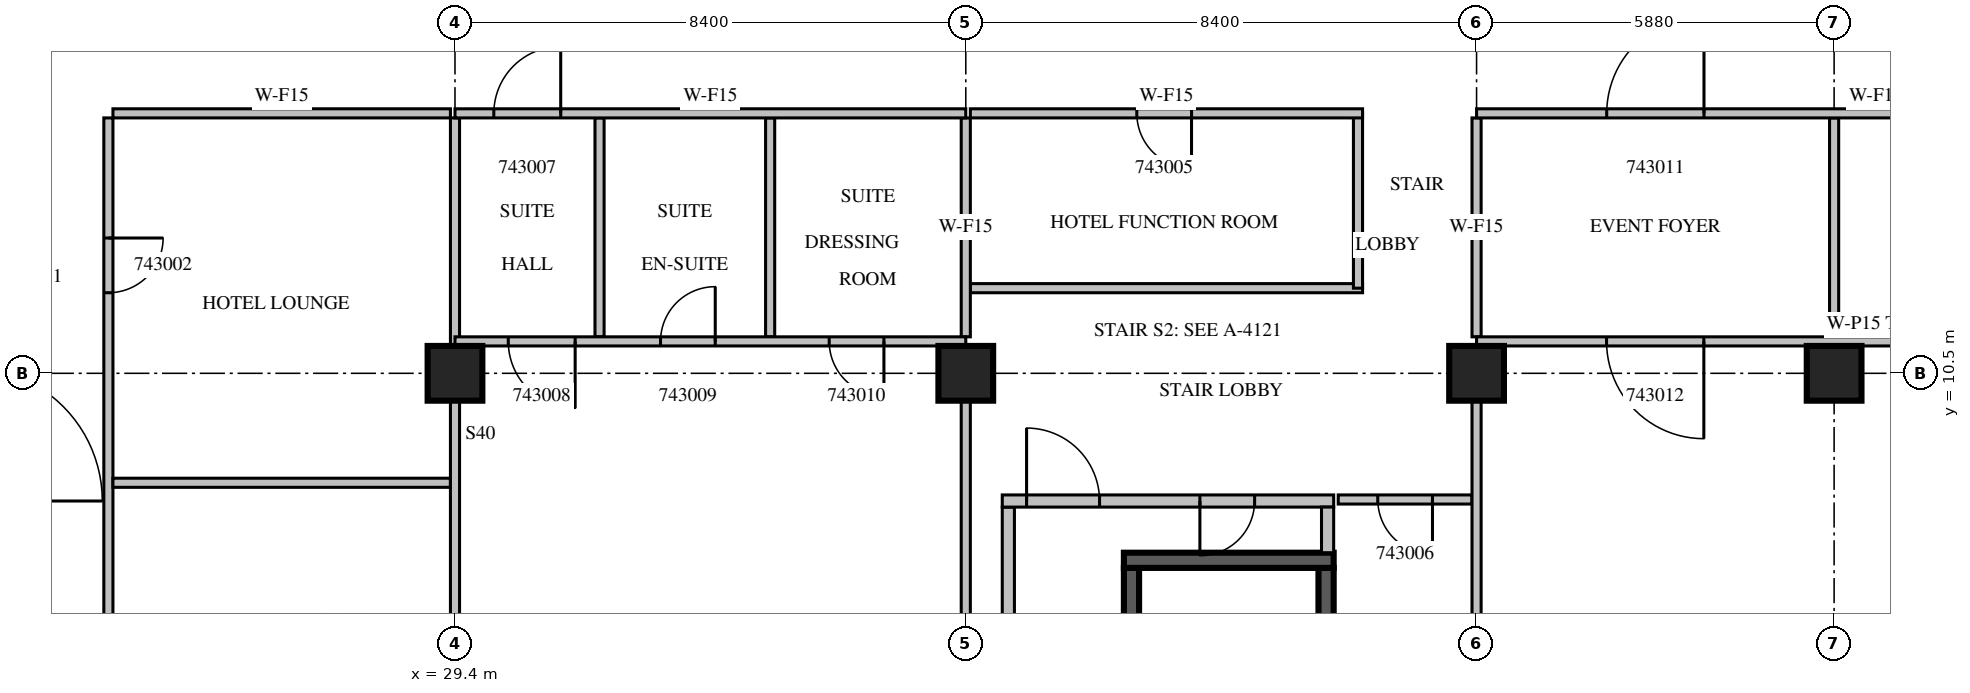
"""IFC4 building model, lengths in metres.
Left out: names, types, materials, properties, quantities, classifications, styles, units other than length and angle.
Written with IfcOpenShell. Run it as: python <this file> out.ifc"""

import sys

from ifc_helpers import new_model, si_unit, direction, frame, frame_2d, origin, origin_2d, place, context, subcontext, project, spatial, rectangle, extrude, source, transform, mapped, element, fill, save


model = new_model("IFC4")
c1 = context("Model", 3, precision=1e-05, world=origin(), true_north=direction((0.0, 1.0)))
c2 = subcontext(c1, "Body", "Model", "MODEL_VIEW")
j1 = project(units=[si_unit("LENGTHUNIT", "METRE"), si_unit("PLANEANGLEUNIT", "RADIAN")], contexts=[c1])
p1 = place(None, origin())
s1 = spatial("IfcSite", under=j1, at=p1, CompositionType="ELEMENT")
p2 = place(p1, origin())
s2 = spatial("IfcBuilding", under=s1, at=p2, CompositionType="ELEMENT")
p3 = place(p2, frame((0.0, 0.0, 196.8)))
s3 = spatial("IfcBuildingStorey", under=s2, at=p3, CompositionType="ELEMENT", Elevation=196.8)
m1 = source(origin(), c2, "Body", "SweptSolid", [
    extrude(rectangle(XDim=0.9, YDim=0.9, at=origin_2d()), origin(), (0.0, 0.0, 1.0), 3.8),
])
for number, where, z_axis, x_axis in (
    (1, (29.4, 10.5, 0.0), (0.0, 0.0, 1.0), (1.0, 0.0, 0.0)),
    (2, (37.8, 10.5, 0.0), (0.0, 0.0, 1.0), (1.0, 0.0, 0.0)),
    (3, (46.2, 10.5, 0.0), (0.0, 0.0, 1.0), (1.0, 0.0, 0.0)),
    (4, (52.08, 10.5, 0.0), (0.0, 0.0, 1.0), (1.0, 0.0, 0.0)),
):
    element("IfcColumn", number, at=place(p3, frame(where, z_axis=z_axis, x_axis=x_axis)), inside=s3, PredefinedType="COLUMN", context=c2, shape_type="MappedRepresentation", body=[
        mapped(m1, transform((0.0, 0.0, 0.0), scale=1.0)),
    ])
m2 = source(origin(), c2, "Body", "SweptSolid", [
    extrude(rectangle(XDim=7.0, YDim=0.25, at=frame_2d((3.5, 0.0))), origin(), (0.0, 0.0, 1.0), 3.4),
])
p4 = place(p3, frame((40.525, 0.3, 0.0), z_axis=(0.0, 0.0, 1.0), x_axis=(0.0, 1.0, 0.0)))
e5 = element("IfcWall", 5, at=p4, inside=s3, PredefinedType="SOLIDWALL", context=c2, shape_type="MappedRepresentation", body=[
    mapped(m2, transform((0.0, 0.0, 0.0), scale=1.0)),
])
m3 = source(origin(), c2, "Body", "SweptSolid", [
    extrude(rectangle(XDim=1.1, YDim=2.1, at=frame_2d((0.55, 1.05))), frame((0.0, 0.135, 0.0), z_axis=(0.0, -1.0, 0.0), x_axis=(1.0, 0.0, 0.0)), (0.0, 0.0, 1.0), 0.27),
])
p5 = place(p4, frame((0.55, 0.0, 0.0)))
e6 = element("IfcOpeningElement", 6, at=p5, cuts=e5, PredefinedType="OPENING", context=c2, shape_type="MappedRepresentation", body=[
    mapped(m3, transform((0.0, 0.0, 0.0), scale=1.0)),
])
p6 = place(p3, frame((43.725, 0.3, 0.0), z_axis=(0.0, 0.0, 1.0), x_axis=(0.0, 1.0, 0.0)))
e7 = element("IfcWall", 7, at=p6, inside=s3, PredefinedType="SOLIDWALL", context=c2, shape_type="MappedRepresentation", body=[
    mapped(m2, transform((0.0, 0.0, 0.0), scale=1.0)),
])
m4 = source(origin(), c2, "Body", "SweptSolid", [
    extrude(rectangle(XDim=3.45, YDim=0.25, at=frame_2d((1.725, 0.0))), origin(), (0.0, 0.0, 1.0), 3.4),
])
p7 = place(p3, frame((40.4, 7.425, 0.0), z_axis=(0.0, 0.0, 1.0), x_axis=(1.0, 0.0, 0.0)))
e8 = element("IfcWall", 8, at=p7, inside=s3, PredefinedType="SOLIDWALL", context=c2, shape_type="MappedRepresentation", body=[
    mapped(m4, transform((0.0, 0.0, 0.0), scale=1.0)),
])
m5 = source(origin(), c2, "Body", "SweptSolid", [
    extrude(rectangle(XDim=8.0, YDim=0.2, at=frame_2d((4.0, 0.0))), origin(), (0.0, 0.0, 1.0), 3.4),
])
p8 = place(p3, frame((38.5, 0.3, 0.0), z_axis=(0.0, 0.0, 1.0), x_axis=(0.0, 1.0, 0.0)))
e9 = element("IfcWall", 9, at=p8, inside=s3, PredefinedType="PARTITIONING", context=c2, shape_type="MappedRepresentation", body=[
    mapped(m5, transform((0.0, 0.0, 0.0), scale=1.0)),
])
m6 = source(origin(), c2, "Body", "SweptSolid", [
    extrude(rectangle(XDim=5.45, YDim=0.2, at=frame_2d((2.725, 0.0))), origin(), (0.0, 0.0, 1.0), 3.4),
])
p9 = place(p3, frame((38.4, 8.4, 0.0), z_axis=(0.0, 0.0, 1.0), x_axis=(1.0, 0.0, 0.0)))
e10 = element("IfcWall", 10, at=p9, inside=s3, PredefinedType="PARTITIONING", context=c2, shape_type="MappedRepresentation", body=[
    mapped(m6, transform((0.0, 0.0, 0.0), scale=1.0)),
])
m7 = source(origin(), c2, "Body", "SweptSolid", [
    extrude(rectangle(XDim=1.2, YDim=2.1, at=frame_2d((0.6, 1.05))), frame((0.0, 0.11, 0.0), z_axis=(0.0, -1.0, 0.0), x_axis=(1.0, 0.0, 0.0)), (0.0, 0.0, 1.0), 0.22),
])
p10 = place(p9, frame((0.4, 0.0, 0.0)))
e11 = element("IfcOpeningElement", 11, at=p10, cuts=e10, PredefinedType="OPENING", context=c2, shape_type="MappedRepresentation", body=[
    mapped(m7, transform((0.0, 0.0, 0.0), scale=1.0)),
])
m8 = source(origin(), c2, "Body", "SweptSolid", [
    extrude(rectangle(XDim=0.9, YDim=2.1, at=frame_2d((0.45, 1.05))), frame((0.0, 0.11, 0.0), z_axis=(0.0, -1.0, 0.0), x_axis=(1.0, 0.0, 0.0)), (0.0, 0.0, 1.0), 0.22),
])
p11 = place(p9, frame((3.25, 0.0, 0.0)))
e12 = element("IfcOpeningElement", 12, at=p11, cuts=e10, PredefinedType="OPENING", context=c2, shape_type="MappedRepresentation", body=[
    mapped(m8, transform((0.0, 0.0, 0.0), scale=1.0)),
])
m9 = source(origin(), c2, "Body", "SweptSolid", [
    extrude(rectangle(XDim=0.75, YDim=0.2, at=frame_2d((0.375, 0.0))), origin(), (0.0, 0.0, 1.0), 3.4),
])
p12 = place(p3, frame((43.75, 7.55, 0.0), z_axis=(0.0, 0.0, 1.0), x_axis=(0.0, 1.0, 0.0)))
e13 = element("IfcWall", 13, at=p12, inside=s3, PredefinedType="PARTITIONING", context=c2, shape_type="MappedRepresentation", body=[
    mapped(m9, transform((0.0, 0.0, 0.0), scale=1.0)),
])
p13 = place(p3, frame((23.7, 14.7, 0.0), z_axis=(0.0, 0.0, 1.0), x_axis=(0.0, -1.0, 0.0)))
e14 = element("IfcWall", 14, at=p13, inside=s3, PredefinedType="PARTITIONING", context=c2, shape_type="SweptSolid", body=[
    extrude(rectangle(XDim=11.225, YDim=0.15, at=frame_2d((5.612, 0.0))), origin(), (0.0, 0.0, 1.0), 3.4),
])
m10 = source(origin(), c2, "Body", "SweptSolid", [
    extrude(rectangle(XDim=0.9, YDim=2.1, at=frame_2d((0.45, 1.05))), frame((0.0, 0.085, 0.0), z_axis=(0.0, -1.0, 0.0), x_axis=(1.0, 0.0, 0.0)), (0.0, 0.0, 1.0), 0.17),
])
p14 = place(p13, frame((8.463, 0.0, 0.0)))
e15 = element("IfcOpeningElement", 15, at=p14, cuts=e14, PredefinedType="OPENING", context=c2, shape_type="MappedRepresentation", body=[
    mapped(m10, transform((0.0, 0.0, 0.0), scale=1.0)),
])
p15 = place(p13, frame((1.975, 0.0, 0.0)))
e16 = element("IfcOpeningElement", 16, at=p15, cuts=e14, PredefinedType="OPENING", context=c2, shape_type="MappedRepresentation", body=[
    mapped(m10, transform((0.0, 0.0, 0.0), scale=1.0)),
])
m11 = source(origin(), c2, "Body", "SweptSolid", [
    extrude(rectangle(XDim=5.55, YDim=0.15, at=frame_2d((2.775, 0.0))), origin(), (0.0, 0.0, 1.0), 3.4),
])
for number, where, z_axis, x_axis in (
    (17, (29.325, 8.7, 0.0), (0.0, 0.0, 1.0), (-1.0, 0.0, 0.0)),
    (18, (29.325, 14.775, 0.0), (0.0, 0.0, 1.0), (-1.0, 0.0, 0.0)),
):
    element("IfcWall", number, at=place(p3, frame(where, z_axis=z_axis, x_axis=x_axis)), inside=s3, PredefinedType="PARTITIONING", context=c2, shape_type="MappedRepresentation", body=[
        mapped(m11, transform((0.0, 0.0, 0.0), scale=1.0)),
    ])
m12 = source(origin(), c2, "Body", "SweptSolid", [
    extrude(rectangle(XDim=6.576, YDim=0.15, at=frame_2d((3.288, 0.0))), origin(), (0.0, 0.0, 1.0), 3.4),
])
p16 = place(p3, frame((29.4, 3.475, 0.0), z_axis=(0.0, 0.0, 1.0), x_axis=(0.0, 1.0, 0.0)))
e19 = element("IfcWall", 19, at=p16, inside=s3, PredefinedType="PARTITIONING", context=c2, shape_type="MappedRepresentation", body=[
    mapped(m12, transform((0.0, 0.0, 0.0), scale=1.0)),
])
m13 = source(origin(), c2, "Body", "SweptSolid", [
    extrude(rectangle(XDim=3.751, YDim=0.15, at=frame_2d((1.875, 0.0))), origin(), (0.0, 0.0, 1.0), 3.4),
])
p17 = place(p3, frame((29.4, 10.949, 0.0), z_axis=(0.0, 0.0, 1.0), x_axis=(0.0, 1.0, 0.0)))
e20 = element("IfcWall", 20, at=p17, inside=s3, PredefinedType="PARTITIONING", context=c2, shape_type="MappedRepresentation", body=[
    mapped(m13, transform((0.0, 0.0, 0.0), scale=1.0)),
])
m14 = source(origin(), c2, "Body", "SweptSolid", [
    extrude(rectangle(XDim=6.45, YDim=0.15, at=frame_2d((3.225, 0.0))), origin(), (0.0, 0.0, 1.0), 3.4),
])
p18 = place(p3, frame((37.875, 11.9, 0.0), z_axis=(0.0, 0.0, 1.0), x_axis=(1.0, 0.0, 0.0)))
e21 = element("IfcWall", 21, at=p18, inside=s3, PredefinedType="PARTITIONING", context=c2, shape_type="MappedRepresentation", body=[
    mapped(m14, transform((0.0, 0.0, 0.0), scale=1.0)),
])
m15 = source(origin(), c2, "Body", "SweptSolid", [
    extrude(rectangle(XDim=2.875, YDim=0.15, at=frame_2d((1.438, 0.0))), origin(), (0.0, 0.0, 1.0), 3.4),
])
p19 = place(p3, frame((44.25, 11.9, 0.0), z_axis=(0.0, 0.0, 1.0), x_axis=(0.0, 1.0, 0.0)))
e22 = element("IfcWall", 22, at=p19, inside=s3, PredefinedType="PARTITIONING", context=c2, shape_type="MappedRepresentation", body=[
    mapped(m15, transform((0.0, 0.0, 0.0), scale=1.0)),
])
p20 = place(p3, frame((44.325, 14.775, 0.0), z_axis=(0.0, 0.0, 1.0), x_axis=(-1.0, 0.0, 0.0)))
e23 = element("IfcWall", 23, at=p20, inside=s3, PredefinedType="PARTITIONING", context=c2, shape_type="MappedRepresentation", body=[
    mapped(m14, transform((0.0, 0.0, 0.0), scale=1.0)),
])
p21 = place(p20, frame((2.812, 0.0, 0.0)))
e24 = element("IfcOpeningElement", 24, at=p21, cuts=e23, PredefinedType="OPENING", context=c2, shape_type="MappedRepresentation", body=[
    mapped(m10, transform((0.0, 0.0, 0.0), scale=1.0)),
])
m16 = source(origin(), c2, "Body", "SweptSolid", [
    extrude(rectangle(XDim=2.2, YDim=0.15, at=frame_2d((1.1, 0.0))), origin(), (0.0, 0.0, 1.0), 3.4),
])
p22 = place(p3, frame((46.125, 8.425, 0.0), z_axis=(0.0, 0.0, 1.0), x_axis=(-1.0, 0.0, 0.0)))
e25 = element("IfcWall", 25, at=p22, inside=s3, PredefinedType="PARTITIONING", context=c2, shape_type="MappedRepresentation", body=[
    mapped(m16, transform((0.0, 0.0, 0.0), scale=1.0)),
])
p23 = place(p22, frame((0.65, 0.0, 0.0)))
e26 = element("IfcOpeningElement", 26, at=p23, cuts=e25, PredefinedType="OPENING", context=c2, shape_type="MappedRepresentation", body=[
    mapped(m10, transform((0.0, 0.0, 0.0), scale=1.0)),
])
m17 = source(origin(), c2, "Body", "SweptSolid", [
    extrude(rectangle(XDim=3.6, YDim=0.15, at=frame_2d((1.8, 0.0))), origin(), (0.0, 0.0, 1.0), 3.4),
])
for number, where, z_axis, x_axis in (
    (27, (31.777, 11.1, 0.0), (0.0, 0.0, 1.0), (0.0, 1.0, 0.0)),
    (28, (34.583, 11.1, 0.0), (0.0, 0.0, 1.0), (0.0, 1.0, 0.0)),
):
    element("IfcWall", number, at=place(p3, frame(where, z_axis=z_axis, x_axis=x_axis)), inside=s3, PredefinedType="PARTITIONING", context=c2, shape_type="MappedRepresentation", body=[
        mapped(m17, transform((0.0, 0.0, 0.0), scale=1.0)),
    ])
m18 = source(origin(), c2, "Body", "SweptSolid", [
    extrude(rectangle(XDim=9.152, YDim=0.15, at=frame_2d((4.576, 0.0))), origin(), (0.0, 0.0, 1.0), 3.4),
])
p24 = place(p3, frame((37.8, 0.899, 0.0), z_axis=(0.0, 0.0, 1.0), x_axis=(0.0, 1.0, 0.0)))
e29 = element("IfcWall", 29, at=p24, inside=s3, PredefinedType="PARTITIONING", context=c2, shape_type="MappedRepresentation", body=[
    mapped(m18, transform((0.0, 0.0, 0.0), scale=1.0)),
])
p25 = place(p3, frame((37.8, 11.1, 0.0), z_axis=(0.0, 0.0, 1.0), x_axis=(0.0, 1.0, 0.0)))
e30 = element("IfcWall", 30, at=p25, inside=s3, PredefinedType="PARTITIONING", context=c2, shape_type="MappedRepresentation", body=[
    mapped(m17, transform((0.0, 0.0, 0.0), scale=1.0)),
])
m19 = source(origin(), c2, "Body", "SweptSolid", [
    extrude(rectangle(XDim=8.4, YDim=0.15, at=frame_2d((4.2, 0.0))), origin(), (0.0, 0.0, 1.0), 3.4),
])
p26 = place(p3, frame((37.8, 11.025, 0.0), z_axis=(0.0, 0.0, 1.0), x_axis=(-1.0, 0.0, 0.0)))
e31 = element("IfcWall", 31, at=p26, inside=s3, PredefinedType="PARTITIONING", context=c2, shape_type="MappedRepresentation", body=[
    mapped(m19, transform((0.0, 0.0, 0.0), scale=1.0)),
])
m20 = source(origin(), c2, "Body", "SweptSolid", [
    extrude(rectangle(XDim=1.1, YDim=2.1, at=frame_2d((0.55, 1.05))), frame((0.0, 0.085, 0.0), z_axis=(0.0, -1.0, 0.0), x_axis=(1.0, 0.0, 0.0)), (0.0, 0.0, 1.0), 0.17),
])
p27 = place(p26, frame((6.424, 0.0, 0.0)))
e32 = element("IfcOpeningElement", 32, at=p27, cuts=e31, PredefinedType="OPENING", context=c2, shape_type="MappedRepresentation", body=[
    mapped(m20, transform((0.0, 0.0, 0.0), scale=1.0)),
])
p28 = place(p26, frame((4.12, 0.0, 0.0)))
e33 = element("IfcOpeningElement", 33, at=p28, cuts=e31, PredefinedType="OPENING", context=c2, shape_type="MappedRepresentation", body=[
    mapped(m10, transform((0.0, 0.0, 0.0), scale=1.0)),
])
p29 = place(p26, frame((1.346, 0.0, 0.0)))
e34 = element("IfcOpeningElement", 34, at=p29, cuts=e31, PredefinedType="OPENING", context=c2, shape_type="MappedRepresentation", body=[
    mapped(m10, transform((0.0, 0.0, 0.0), scale=1.0)),
])
p30 = place(p3, frame((52.08, 11.1, 0.0), z_axis=(0.0, 0.0, 1.0), x_axis=(0.0, 1.0, 0.0)))
e35 = element("IfcWall", 35, at=p30, inside=s3, PredefinedType="PARTITIONING", context=c2, shape_type="MappedRepresentation", body=[
    mapped(m17, transform((0.0, 0.0, 0.0), scale=1.0)),
])
p31 = place(p3, frame((46.2, 0.899, 0.0), z_axis=(0.0, 0.0, 1.0), x_axis=(0.0, 1.0, 0.0)))
e36 = element("IfcWall", 36, at=p31, inside=s3, PredefinedType="PARTITIONING", context=c2, shape_type="MappedRepresentation", body=[
    mapped(m18, transform((0.0, 0.0, 0.0), scale=1.0)),
])
p32 = place(p3, frame((46.2, 11.1, 0.0), z_axis=(0.0, 0.0, 1.0), x_axis=(0.0, 1.0, 0.0)))
e37 = element("IfcWall", 37, at=p32, inside=s3, PredefinedType="PARTITIONING", context=c2, shape_type="MappedRepresentation", body=[
    mapped(m17, transform((0.0, 0.0, 0.0), scale=1.0)),
])
m21 = source(origin(), c2, "Body", "SweptSolid", [
    extrude(rectangle(XDim=13.14, YDim=0.15, at=frame_2d((6.57, 0.0))), origin(), (0.0, 0.0, 1.0), 3.4),
])
p33 = place(p3, frame((59.34, 11.025, 0.0), z_axis=(0.0, 0.0, 1.0), x_axis=(-1.0, 0.0, 0.0)))
e38 = element("IfcWall", 38, at=p33, inside=s3, PredefinedType="PARTITIONING", context=c2, shape_type="MappedRepresentation", body=[
    mapped(m21, transform((0.0, 0.0, 0.0), scale=1.0)),
])
m22 = source(origin(), c2, "Body", "SweptSolid", [
    extrude(rectangle(XDim=1.6, YDim=2.1, at=frame_2d((0.8, 1.05))), frame((0.0, 0.085, 0.0), z_axis=(0.0, -1.0, 0.0), x_axis=(1.0, 0.0, 0.0)), (0.0, 0.0, 1.0), 0.17),
])
p34 = place(p33, frame((9.402, 0.0, 0.0)))
e39 = element("IfcOpeningElement", 39, at=p34, cuts=e38, PredefinedType="OPENING", context=c2, shape_type="MappedRepresentation", body=[
    mapped(m22, transform((0.0, 0.0, 0.0), scale=1.0)),
])
m23 = source(origin(), c2, "Body", "SweptSolid", [
    extrude(rectangle(XDim=1.0, YDim=2.1, at=frame_2d((0.5, 1.05))), frame((0.0, 0.085, 0.0), z_axis=(0.0, -1.0, 0.0), x_axis=(1.0, 0.0, 0.0)), (0.0, 0.0, 1.0), 0.17),
])
p35 = place(p33, frame((4.549, 0.0, 0.0)))
e40 = element("IfcOpeningElement", 40, at=p35, cuts=e38, PredefinedType="OPENING", context=c2, shape_type="MappedRepresentation", body=[
    mapped(m23, transform((0.0, 0.0, 0.0), scale=1.0)),
])
p36 = place(p33, frame((2.038, 0.0, 0.0)))
e41 = element("IfcOpeningElement", 41, at=p36, cuts=e38, PredefinedType="OPENING", context=c2, shape_type="MappedRepresentation", body=[
    mapped(m23, transform((0.0, 0.0, 0.0), scale=1.0)),
])
p37 = place(p3, frame((37.8, 14.775, 0.0), z_axis=(0.0, 0.0, 1.0), x_axis=(-1.0, 0.0, 0.0)))
e42 = element("IfcWall", 42, at=p37, inside=s3, PredefinedType="PARTITIONING", context=c2, shape_type="MappedRepresentation", body=[
    mapped(m19, transform((0.0, 0.0, 0.0), scale=1.0)),
])
p38 = place(p37, frame((6.662, 0.0, 0.0)))
e43 = element("IfcOpeningElement", 43, at=p38, cuts=e42, PredefinedType="OPENING", context=c2, shape_type="MappedRepresentation", body=[
    mapped(m20, transform((0.0, 0.0, 0.0), scale=1.0)),
])
p39 = place(p3, frame((59.34, 14.775, 0.0), z_axis=(0.0, 0.0, 1.0), x_axis=(-1.0, 0.0, 0.0)))
e44 = element("IfcWall", 44, at=p39, inside=s3, PredefinedType="PARTITIONING", context=c2, shape_type="MappedRepresentation", body=[
    mapped(m21, transform((0.0, 0.0, 0.0), scale=1.0)),
])
p40 = place(p39, frame((9.4, 0.0, 0.0)))
e45 = element("IfcOpeningElement", 45, at=p40, cuts=e44, PredefinedType="OPENING", context=c2, shape_type="MappedRepresentation", body=[
    mapped(m22, transform((0.0, 0.0, 0.0), scale=1.0)),
])
p41 = place(p39, frame((4.837, 0.0, 0.0)))
e46 = element("IfcOpeningElement", 46, at=p41, cuts=e44, PredefinedType="OPENING", context=c2, shape_type="MappedRepresentation", body=[
    mapped(m10, transform((0.0, 0.0, 0.0), scale=1.0)),
])
m24 = source(origin(), c2, "Body", "SweptSolid", [
    extrude(rectangle(XDim=1.2, YDim=2.1, at=frame_2d((0.6, 1.05))), frame((0.0, 0.025, 0.0), z_axis=(0.0, -1.0, 0.0), x_axis=(1.0, 0.0, 0.0)), (0.0, 0.0, 1.0), 0.05),
])
p42 = place(p10, origin())
e47 = element("IfcDoor", 47, at=p42, inside=s3, OperationType="SINGLE_SWING_LEFT", PredefinedType="DOOR", context=c2, shape_type="MappedRepresentation", body=[
    mapped(m24, transform((0.0, 0.0, 0.0), scale=1.0)),
])
fill(e11, e47)
m25 = source(origin(), c2, "Body", "SweptSolid", [
    extrude(rectangle(XDim=0.9, YDim=2.1, at=frame_2d((0.45, 1.05))), frame((0.0, 0.025, 0.0), z_axis=(0.0, -1.0, 0.0), x_axis=(1.0, 0.0, 0.0)), (0.0, 0.0, 1.0), 0.05),
])
p43 = place(p11, origin())
e48 = element("IfcDoor", 48, at=p43, inside=s3, OperationType="SINGLE_SWING_RIGHT", PredefinedType="DOOR", context=c2, shape_type="MappedRepresentation", body=[
    mapped(m25, transform((0.0, 0.0, 0.0), scale=1.0)),
])
fill(e12, e48)
p44 = place(p15, origin())
e49 = element("IfcDoor", 49, at=p44, inside=s3, OperationType="SINGLE_SWING_LEFT", PredefinedType="DOOR", context=c2, shape_type="MappedRepresentation", body=[
    mapped(m25, transform((0.0, 0.0, 0.0), scale=1.0)),
])
fill(e16, e49)
p45 = place(p21, origin())
e50 = element("IfcDoor", 50, at=p45, inside=s3, OperationType="SINGLE_SWING_LEFT", PredefinedType="DOOR", context=c2, shape_type="MappedRepresentation", body=[
    mapped(m25, transform((0.0, 0.0, 0.0), scale=1.0)),
])
fill(e24, e50)
p46 = place(p23, origin())
e51 = element("IfcDoor", 51, at=p46, inside=s3, OperationType="SINGLE_SWING_LEFT", PredefinedType="DOOR", context=c2, shape_type="MappedRepresentation", body=[
    mapped(m25, transform((0.0, 0.0, 0.0), scale=1.0)),
])
fill(e26, e51)
m26 = source(origin(), c2, "Body", "SweptSolid", [
    extrude(rectangle(XDim=1.1, YDim=2.1, at=frame_2d((0.55, 1.05))), frame((0.0, 0.025, 0.0), z_axis=(0.0, -1.0, 0.0), x_axis=(1.0, 0.0, 0.0)), (0.0, 0.0, 1.0), 0.05),
])
p47 = place(p38, origin())
e52 = element("IfcDoor", 52, at=p47, inside=s3, OperationType="SINGLE_SWING_RIGHT", PredefinedType="DOOR", context=c2, shape_type="MappedRepresentation", body=[
    mapped(m26, transform((0.0, 0.0, 0.0), scale=1.0)),
])
fill(e43, e52)
p48 = place(p27, origin())
e53 = element("IfcDoor", 53, at=p48, inside=s3, OperationType="SINGLE_SWING_LEFT", PredefinedType="DOOR", context=c2, shape_type="MappedRepresentation", body=[
    mapped(m26, transform((0.0, 0.0, 0.0), scale=1.0)),
])
fill(e32, e53)
p49 = place(p28, origin())
e54 = element("IfcDoor", 54, at=p49, inside=s3, OperationType="SINGLE_SWING_RIGHT", PredefinedType="DOOR", context=c2, shape_type="MappedRepresentation", body=[
    mapped(m25, transform((0.0, 0.0, 0.0), scale=1.0)),
])
fill(e33, e54)
p50 = place(p29, origin())
e55 = element("IfcDoor", 55, at=p50, inside=s3, OperationType="SINGLE_SWING_LEFT", PredefinedType="DOOR", context=c2, shape_type="MappedRepresentation", body=[
    mapped(m25, transform((0.0, 0.0, 0.0), scale=1.0)),
])
fill(e34, e55)
m27 = source(origin(), c2, "Body", "SweptSolid", [
    extrude(rectangle(XDim=1.6, YDim=2.1, at=frame_2d((0.8, 1.05))), frame((0.0, 0.025, 0.0), z_axis=(0.0, -1.0, 0.0), x_axis=(1.0, 0.0, 0.0)), (0.0, 0.0, 1.0), 0.05),
])
p51 = place(p40, origin())
e56 = element("IfcDoor", 56, at=p51, inside=s3, OperationType="SINGLE_SWING_RIGHT", PredefinedType="DOOR", context=c2, shape_type="MappedRepresentation", body=[
    mapped(m27, transform((0.0, 0.0, 0.0), scale=1.0)),
])
fill(e45, e56)
p52 = place(p34, origin())
e57 = element("IfcDoor", 57, at=p52, inside=s3, OperationType="SINGLE_SWING_LEFT", PredefinedType="DOOR", context=c2, shape_type="MappedRepresentation", body=[
    mapped(m27, transform((0.0, 0.0, 0.0), scale=1.0)),
])
fill(e39, e57)
save(model, sys.argv[1])
